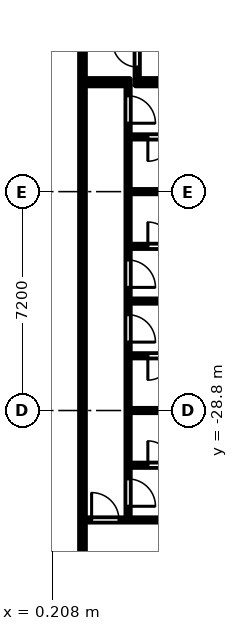
"""IFC4 building model, lengths in metres.
Left out: names, types, materials, properties, quantities, classifications, styles, units other than length and angle.
Written with IfcOpenShell. Run it as: python <this file> out.ifc"""

import sys

from ifc_helpers import new_model, si_unit, direction, frame, frame_2d, origin, place, context, subcontext, project, spatial, rectangle, extrude, element, fill, save


model = new_model("IFC4")
c1 = context("Model", 3, precision=1e-05, world=origin(), true_north=direction((0.0, 1.0)))
c2 = subcontext(c1, "Body", "Model", "MODEL_VIEW")
j1 = project(units=[si_unit("LENGTHUNIT", "METRE"), si_unit("PLANEANGLEUNIT", "RADIAN")], contexts=[c1])
p1 = place(None, origin())
s1 = spatial("IfcSite", under=j1, at=p1, CompositionType="ELEMENT")
p2 = place(p1, origin())
s2 = spatial("IfcBuilding", under=s1, at=p2, CompositionType="ELEMENT")
p3 = place(p2, frame((0.0, 0.0, 66.9)))
s3 = spatial("IfcBuildingStorey", under=s2, at=p3, CompositionType="ELEMENT", Elevation=66.9)
p4 = place(p3, frame((1.2, -36.5, 0.0), z_axis=(0.0, 0.0, 1.0), x_axis=(0.0, 1.0, 0.0)))
e1 = element("IfcWall", 1, at=p4, inside=s3, PredefinedType="PARTITIONING", context=c2, shape_type="SweptSolid", body=[
    extrude(rectangle(XDim=35.375, YDim=0.15, at=frame_2d((17.688, 0.0))), origin(), (0.0, 0.0, 1.0), 2.575),
])
p5 = place(p4, frame((31.85, 0.0, 0.0)))
e2 = element("IfcOpeningElement", 2, at=p5, cuts=e1, PredefinedType="OPENING", context=c2, shape_type="SweptSolid", body=[
    extrude(rectangle(XDim=0.9, YDim=2.1, at=frame_2d((0.45, 1.05))), frame((0.0, 0.085, 0.0), z_axis=(0.0, -1.0, 0.0), x_axis=(1.0, 0.0, 0.0)), (0.0, 0.0, 1.0), 0.17),
])
p6 = place(p4, frame((23.05, 0.0, 0.0)))
e3 = element("IfcOpeningElement", 3, at=p6, cuts=e1, PredefinedType="OPENING", context=c2, shape_type="SweptSolid", body=[
    extrude(rectangle(XDim=0.9, YDim=2.1, at=frame_2d((0.45, 1.05))), frame((0.0, 0.085, 0.0), z_axis=(0.0, -1.0, 0.0), x_axis=(1.0, 0.0, 0.0)), (0.0, 0.0, 1.0), 0.17),
])
p7 = place(p4, frame((26.65, 0.0, 0.0)))
e4 = element("IfcOpeningElement", 4, at=p7, cuts=e1, PredefinedType="OPENING", context=c2, shape_type="SweptSolid", body=[
    extrude(rectangle(XDim=0.9, YDim=2.1, at=frame_2d((0.45, 1.05))), frame((0.0, 0.085, 0.0), z_axis=(0.0, -1.0, 0.0), x_axis=(1.0, 0.0, 0.0)), (0.0, 0.0, 1.0), 0.17),
])
p8 = place(p4, frame((20.5, 0.0, 0.0)))
e5 = element("IfcOpeningElement", 5, at=p8, cuts=e1, PredefinedType="OPENING", context=c2, shape_type="SweptSolid", body=[
    extrude(rectangle(XDim=1.0, YDim=2.1, at=frame_2d((0.5, 1.05))), frame((0.0, 0.085, 0.0), z_axis=(0.0, -1.0, 0.0), x_axis=(1.0, 0.0, 0.0)), (0.0, 0.0, 1.0), 0.17),
])
p9 = place(p4, frame((1.55, 0.0, 0.0)))
e6 = element("IfcOpeningElement", 6, at=p9, cuts=e1, PredefinedType="OPENING", context=c2, shape_type="SweptSolid", body=[
    extrude(rectangle(XDim=1.0, YDim=2.1, at=frame_2d((0.5, 1.05))), frame((0.0, 0.085, 0.0), z_axis=(0.0, -1.0, 0.0), x_axis=(1.0, 0.0, 0.0)), (0.0, 0.0, 1.0), 0.17),
])
p10 = place(p3, frame((1.275, -32.4, 0.0), z_axis=(0.0, 0.0, 1.0), x_axis=(1.0, 0.0, 0.0)))
e7 = element("IfcWall", 7, at=p10, inside=s3, PredefinedType="PARTITIONING", context=c2, shape_type="SweptSolid", body=[
    extrude(rectangle(XDim=5.625, YDim=0.1, at=frame_2d((2.812, 0.0))), origin(), (0.0, 0.0, 1.0), 2.575),
])
p11 = place(p10, frame((0.225, 0.0, 0.0)))
e8 = element("IfcOpeningElement", 8, at=p11, cuts=e7, PredefinedType="OPENING", context=c2, shape_type="SweptSolid", body=[
    extrude(rectangle(XDim=0.9, YDim=2.1, at=frame_2d((0.45, 1.05))), frame((0.0, 0.06, 0.0), z_axis=(0.0, -1.0, 0.0), x_axis=(1.0, 0.0, 0.0)), (0.0, 0.0, 1.0), 0.12),
])
p12 = place(p3, frame((1.275, -18.0, 0.0), z_axis=(0.0, 0.0, 1.0), x_axis=(1.0, 0.0, 0.0)))
e9 = element("IfcWall", 9, at=p12, inside=s3, PredefinedType="PARTITIONING", context=c2, shape_type="SweptSolid", body=[
    extrude(rectangle(XDim=1.475, YDim=0.2, at=frame_2d((0.738, 0.0))), origin(), (0.0, 0.0, 1.0), 2.575),
])
p13 = place(p3, frame((2.7, -32.35, 0.0), z_axis=(0.0, 0.0, 1.0), x_axis=(0.0, 1.0, 0.0)))
e10 = element("IfcWall", 10, at=p13, inside=s3, PredefinedType="PARTITIONING", context=c2, shape_type="SweptSolid", body=[
    extrude(rectangle(XDim=14.25, YDim=0.1, at=frame_2d((7.125, 0.0))), origin(), (0.0, 0.0, 1.0), 2.575),
])
p14 = place(p13, frame((0.4, 0.0, 0.0)))
e11 = element("IfcOpeningElement", 11, at=p14, cuts=e10, PredefinedType="OPENING", context=c2, shape_type="SweptSolid", body=[
    extrude(rectangle(XDim=0.9, YDim=2.1, at=frame_2d((0.45, 1.05))), frame((0.0, 0.06, 0.0), z_axis=(0.0, -1.0, 0.0), x_axis=(1.0, 0.0, 0.0)), (0.0, 0.0, 1.0), 0.12),
])
p15 = place(p13, frame((5.8, 0.0, 0.0)))
e12 = element("IfcOpeningElement", 12, at=p15, cuts=e10, PredefinedType="OPENING", context=c2, shape_type="SweptSolid", body=[
    extrude(rectangle(XDim=0.9, YDim=2.1, at=frame_2d((0.45, 1.05))), frame((0.0, 0.06, 0.0), z_axis=(0.0, -1.0, 0.0), x_axis=(1.0, 0.0, 0.0)), (0.0, 0.0, 1.0), 0.12),
])
p16 = place(p13, frame((7.6, 0.0, 0.0)))
e13 = element("IfcOpeningElement", 13, at=p16, cuts=e10, PredefinedType="OPENING", context=c2, shape_type="SweptSolid", body=[
    extrude(rectangle(XDim=0.9, YDim=2.1, at=frame_2d((0.45, 1.05))), frame((0.0, 0.06, 0.0), z_axis=(0.0, -1.0, 0.0), x_axis=(1.0, 0.0, 0.0)), (0.0, 0.0, 1.0), 0.12),
])
p17 = place(p13, frame((13.0, 0.0, 0.0)))
e14 = element("IfcOpeningElement", 14, at=p17, cuts=e10, PredefinedType="OPENING", context=c2, shape_type="SweptSolid", body=[
    extrude(rectangle(XDim=0.9, YDim=2.1, at=frame_2d((0.45, 1.05))), frame((0.0, 0.06, 0.0), z_axis=(0.0, -1.0, 0.0), x_axis=(1.0, 0.0, 0.0)), (0.0, 0.0, 1.0), 0.12),
])
p18 = place(p3, frame((2.75, -30.6, 0.0), z_axis=(0.0, 0.0, 1.0), x_axis=(1.0, 0.0, 0.0)))
e15 = element("IfcWall", 15, at=p18, inside=s3, PredefinedType="PARTITIONING", context=c2, shape_type="SweptSolid", body=[
    extrude(rectangle(XDim=2.1, YDim=0.1, at=frame_2d((1.05, 0.0))), origin(), (0.0, 0.0, 1.0), 2.575),
])
p19 = place(p18, frame((0.6, 0.0, 0.0)))
e16 = element("IfcOpeningElement", 16, at=p19, cuts=e15, PredefinedType="OPENING", context=c2, shape_type="SweptSolid", body=[
    extrude(rectangle(XDim=0.8, YDim=2.1, at=frame_2d((0.4, 1.05))), frame((0.0, 0.06, 0.0), z_axis=(0.0, -1.0, 0.0), x_axis=(1.0, 0.0, 0.0)), (0.0, 0.0, 1.0), 0.12),
])
p20 = place(p3, frame((2.75, -28.8, 0.0), z_axis=(0.0, 0.0, 1.0), x_axis=(1.0, 0.0, 0.0)))
e17 = element("IfcWall", 17, at=p20, inside=s3, PredefinedType="PARTITIONING", context=c2, shape_type="SweptSolid", body=[
    extrude(rectangle(XDim=4.15, YDim=0.1, at=frame_2d((2.075, 0.0))), origin(), (0.0, 0.0, 1.0), 2.575),
])
p21 = place(p3, frame((2.75, -27.0, 0.0), z_axis=(0.0, 0.0, 1.0), x_axis=(1.0, 0.0, 0.0)))
e18 = element("IfcWall", 18, at=p21, inside=s3, PredefinedType="PARTITIONING", context=c2, shape_type="SweptSolid", body=[
    extrude(rectangle(XDim=2.1, YDim=0.1, at=frame_2d((1.05, 0.0))), origin(), (0.0, 0.0, 1.0), 2.575),
])
p22 = place(p21, frame((0.6, 0.0, 0.0)))
e19 = element("IfcOpeningElement", 19, at=p22, cuts=e18, PredefinedType="OPENING", context=c2, shape_type="SweptSolid", body=[
    extrude(rectangle(XDim=0.8, YDim=2.1, at=frame_2d((0.4, 1.05))), frame((0.0, 0.06, 0.0), z_axis=(0.0, -1.0, 0.0), x_axis=(1.0, 0.0, 0.0)), (0.0, 0.0, 1.0), 0.12),
])
p23 = place(p3, frame((2.75, -25.2, 0.0), z_axis=(0.0, 0.0, 1.0), x_axis=(1.0, 0.0, 0.0)))
e20 = element("IfcWall", 20, at=p23, inside=s3, PredefinedType="PARTITIONING", context=c2, shape_type="SweptSolid", body=[
    extrude(rectangle(XDim=4.15, YDim=0.1, at=frame_2d((2.075, 0.0))), origin(), (0.0, 0.0, 1.0), 2.575),
])
p24 = place(p3, frame((2.75, -23.4, 0.0), z_axis=(0.0, 0.0, 1.0), x_axis=(1.0, 0.0, 0.0)))
e21 = element("IfcWall", 21, at=p24, inside=s3, PredefinedType="PARTITIONING", context=c2, shape_type="SweptSolid", body=[
    extrude(rectangle(XDim=2.1, YDim=0.1, at=frame_2d((1.05, 0.0))), origin(), (0.0, 0.0, 1.0), 2.575),
])
p25 = place(p24, frame((0.6, 0.0, 0.0)))
e22 = element("IfcOpeningElement", 22, at=p25, cuts=e21, PredefinedType="OPENING", context=c2, shape_type="SweptSolid", body=[
    extrude(rectangle(XDim=0.8, YDim=2.1, at=frame_2d((0.4, 1.05))), frame((0.0, 0.06, 0.0), z_axis=(0.0, -1.0, 0.0), x_axis=(1.0, 0.0, 0.0)), (0.0, 0.0, 1.0), 0.12),
])
p26 = place(p3, frame((2.75, -21.6, 0.0), z_axis=(0.0, 0.0, 1.0), x_axis=(1.0, 0.0, 0.0)))
e23 = element("IfcWall", 23, at=p26, inside=s3, PredefinedType="PARTITIONING", context=c2, shape_type="SweptSolid", body=[
    extrude(rectangle(XDim=4.15, YDim=0.1, at=frame_2d((2.075, 0.0))), origin(), (0.0, 0.0, 1.0), 2.575),
])
p27 = place(p3, frame((2.75, -19.8, 0.0), z_axis=(0.0, 0.0, 1.0), x_axis=(1.0, 0.0, 0.0)))
e24 = element("IfcWall", 24, at=p27, inside=s3, PredefinedType="PARTITIONING", context=c2, shape_type="SweptSolid", body=[
    extrude(rectangle(XDim=2.1, YDim=0.1, at=frame_2d((1.05, 0.0))), origin(), (0.0, 0.0, 1.0), 2.575),
])
p28 = place(p27, frame((0.6, 0.0, 0.0)))
e25 = element("IfcOpeningElement", 25, at=p28, cuts=e24, PredefinedType="OPENING", context=c2, shape_type="SweptSolid", body=[
    extrude(rectangle(XDim=0.8, YDim=2.1, at=frame_2d((0.4, 1.05))), frame((0.0, 0.06, 0.0), z_axis=(0.0, -1.0, 0.0), x_axis=(1.0, 0.0, 0.0)), (0.0, 0.0, 1.0), 0.12),
])
p29 = place(p3, frame((3.0, -17.9, 0.0), z_axis=(0.0, 0.0, 1.0), x_axis=(0.0, 1.0, 0.0)))
e26 = element("IfcWall", 26, at=p29, inside=s3, PredefinedType="PARTITIONING", context=c2, shape_type="SweptSolid", body=[
    extrude(rectangle(XDim=1.65, YDim=0.1, at=frame_2d((0.825, 0.0))), origin(), (0.0, 0.0, 1.0), 2.575),
])
p30 = place(p29, frame((0.4, 0.0, 0.0)))
e27 = element("IfcOpeningElement", 27, at=p30, cuts=e26, PredefinedType="OPENING", context=c2, shape_type="SweptSolid", body=[
    extrude(rectangle(XDim=0.8, YDim=2.1, at=frame_2d((0.4, 1.05))), frame((0.0, 0.06, 0.0), z_axis=(0.0, -1.0, 0.0), x_axis=(1.0, 0.0, 0.0)), (0.0, 0.0, 1.0), 0.12),
])
p31 = place(p3, frame((2.95, -18.0, 0.0), z_axis=(0.0, 0.0, 1.0), x_axis=(1.0, 0.0, 0.0)))
e28 = element("IfcWall", 28, at=p31, inside=s3, PredefinedType="PARTITIONING", context=c2, shape_type="SweptSolid", body=[
    extrude(rectangle(XDim=3.95, YDim=0.2, at=frame_2d((1.975, 0.0))), origin(), (0.0, 0.0, 1.0), 2.575),
])
p32 = place(p30, origin())
e29 = element("IfcDoor", 29, at=p32, inside=s3, OperationType="SINGLE_SWING_RIGHT", PredefinedType="DOOR", context=c2, shape_type="SweptSolid", body=[
    extrude(rectangle(XDim=0.8, YDim=2.1, at=frame_2d((0.4, 1.05))), frame((0.0, 0.025, 0.0), z_axis=(0.0, -1.0, 0.0), x_axis=(1.0, 0.0, 0.0)), (0.0, 0.0, 1.0), 0.05),
])
fill(e27, e29)
p33 = place(p11, origin())
e30 = element("IfcDoor", 30, at=p33, inside=s3, OperationType="SINGLE_SWING_LEFT", PredefinedType="DOOR", context=c2, shape_type="SweptSolid", body=[
    extrude(rectangle(XDim=0.9, YDim=2.1, at=frame_2d((0.45, 1.05))), frame((0.0, 0.025, 0.0), z_axis=(0.0, -1.0, 0.0), x_axis=(1.0, 0.0, 0.0)), (0.0, 0.0, 1.0), 0.05),
])
fill(e8, e30)
p34 = place(p14, frame((0.9, 0.0, 0.0), z_axis=(0.0, 0.0, 1.0), x_axis=(-1.0, 0.0, 0.0)))
e31 = element("IfcDoor", 31, at=p34, inside=s3, OperationType="SINGLE_SWING_RIGHT", PredefinedType="DOOR", context=c2, shape_type="SweptSolid", body=[
    extrude(rectangle(XDim=0.9, YDim=2.1, at=frame_2d((0.45, 1.05))), frame((0.0, 0.025, 0.0), z_axis=(0.0, -1.0, 0.0), x_axis=(1.0, 0.0, 0.0)), (0.0, 0.0, 1.0), 0.05),
])
fill(e11, e31)
p35 = place(p15, frame((0.9, 0.0, 0.0), z_axis=(0.0, 0.0, 1.0), x_axis=(-1.0, 0.0, 0.0)))
e32 = element("IfcDoor", 32, at=p35, inside=s3, OperationType="SINGLE_SWING_RIGHT", PredefinedType="DOOR", context=c2, shape_type="SweptSolid", body=[
    extrude(rectangle(XDim=0.9, YDim=2.1, at=frame_2d((0.45, 1.05))), frame((0.0, 0.025, 0.0), z_axis=(0.0, -1.0, 0.0), x_axis=(1.0, 0.0, 0.0)), (0.0, 0.0, 1.0), 0.05),
])
fill(e12, e32)
p36 = place(p16, frame((0.9, 0.0, 0.0), z_axis=(0.0, 0.0, 1.0), x_axis=(-1.0, 0.0, 0.0)))
e33 = element("IfcDoor", 33, at=p36, inside=s3, OperationType="SINGLE_SWING_RIGHT", PredefinedType="DOOR", context=c2, shape_type="SweptSolid", body=[
    extrude(rectangle(XDim=0.9, YDim=2.1, at=frame_2d((0.45, 1.05))), frame((0.0, 0.025, 0.0), z_axis=(0.0, -1.0, 0.0), x_axis=(1.0, 0.0, 0.0)), (0.0, 0.0, 1.0), 0.05),
])
fill(e13, e33)
p37 = place(p17, frame((0.9, 0.0, 0.0), z_axis=(0.0, 0.0, 1.0), x_axis=(-1.0, 0.0, 0.0)))
e34 = element("IfcDoor", 34, at=p37, inside=s3, OperationType="SINGLE_SWING_RIGHT", PredefinedType="DOOR", context=c2, shape_type="SweptSolid", body=[
    extrude(rectangle(XDim=0.9, YDim=2.1, at=frame_2d((0.45, 1.05))), frame((0.0, 0.025, 0.0), z_axis=(0.0, -1.0, 0.0), x_axis=(1.0, 0.0, 0.0)), (0.0, 0.0, 1.0), 0.05),
])
fill(e14, e34)
p38 = place(p28, frame((0.8, 0.0, 0.0), z_axis=(0.0, 0.0, 1.0), x_axis=(-1.0, 0.0, 0.0)))
e35 = element("IfcDoor", 35, at=p38, inside=s3, OperationType="SINGLE_SWING_RIGHT", PredefinedType="DOOR", context=c2, shape_type="SweptSolid", body=[
    extrude(rectangle(XDim=0.8, YDim=2.1, at=frame_2d((0.4, 1.05))), frame((0.0, 0.025, 0.0), z_axis=(0.0, -1.0, 0.0), x_axis=(1.0, 0.0, 0.0)), (0.0, 0.0, 1.0), 0.05),
])
fill(e25, e35)
p39 = place(p25, origin())
e36 = element("IfcDoor", 36, at=p39, inside=s3, OperationType="SINGLE_SWING_LEFT", PredefinedType="DOOR", context=c2, shape_type="SweptSolid", body=[
    extrude(rectangle(XDim=0.8, YDim=2.1, at=frame_2d((0.4, 1.05))), frame((0.0, 0.025, 0.0), z_axis=(0.0, -1.0, 0.0), x_axis=(1.0, 0.0, 0.0)), (0.0, 0.0, 1.0), 0.05),
])
fill(e22, e36)
p40 = place(p22, frame((0.8, 0.0, 0.0), z_axis=(0.0, 0.0, 1.0), x_axis=(-1.0, 0.0, 0.0)))
e37 = element("IfcDoor", 37, at=p40, inside=s3, OperationType="SINGLE_SWING_RIGHT", PredefinedType="DOOR", context=c2, shape_type="SweptSolid", body=[
    extrude(rectangle(XDim=0.8, YDim=2.1, at=frame_2d((0.4, 1.05))), frame((0.0, 0.025, 0.0), z_axis=(0.0, -1.0, 0.0), x_axis=(1.0, 0.0, 0.0)), (0.0, 0.0, 1.0), 0.05),
])
fill(e19, e37)
p41 = place(p19, origin())
e38 = element("IfcDoor", 38, at=p41, inside=s3, OperationType="SINGLE_SWING_LEFT", PredefinedType="DOOR", context=c2, shape_type="SweptSolid", body=[
    extrude(rectangle(XDim=0.8, YDim=2.1, at=frame_2d((0.4, 1.05))), frame((0.0, 0.025, 0.0), z_axis=(0.0, -1.0, 0.0), x_axis=(1.0, 0.0, 0.0)), (0.0, 0.0, 1.0), 0.05),
])
fill(e16, e38)
save(model, sys.argv[1])
